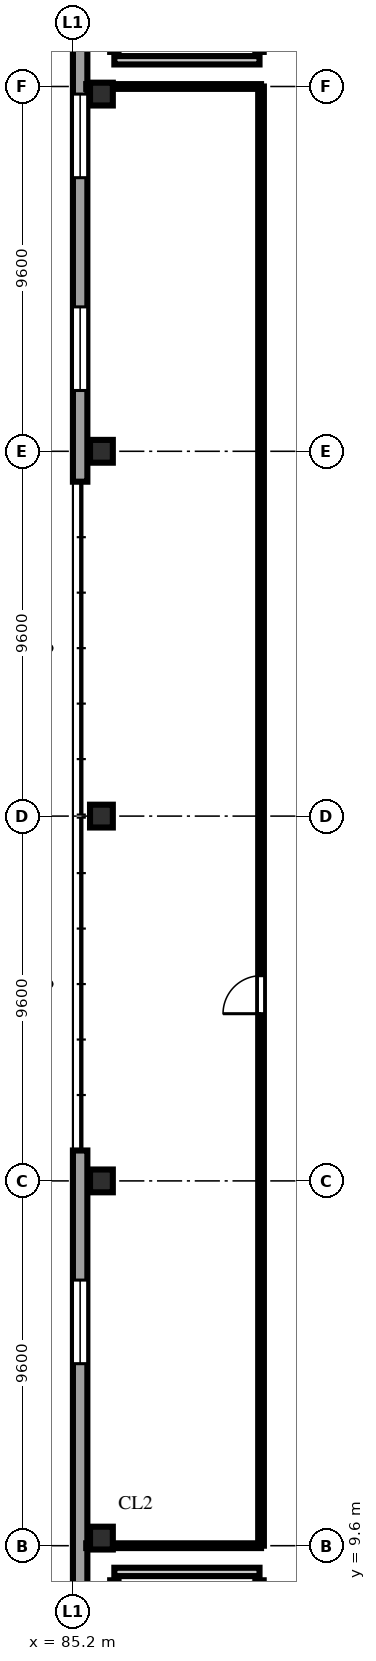
"""IFC4 building model, lengths in metres.
Left out: names, types, materials, properties, quantities, classifications, styles, units other than length and angle.
Written with IfcOpenShell. Run it as: python <this file> out.ifc"""

import sys

from ifc_helpers import new_model, si_unit, direction, frame, frame_2d, origin, origin_2d, place, context, subcontext, project, spatial, rectangle, extrude, element, fill, save


model = new_model("IFC4")
c1 = context("Model", 3, precision=1e-05, world=origin(), true_north=direction((0.0, 1.0)))
c2 = subcontext(c1, "Body", "Model", "MODEL_VIEW")
j1 = project(units=[si_unit("LENGTHUNIT", "METRE"), si_unit("PLANEANGLEUNIT", "RADIAN")], contexts=[c1])
p1 = place(None, origin())
s1 = spatial("IfcSite", under=j1, at=p1, CompositionType="ELEMENT")
p2 = place(p1, origin())
s2 = spatial("IfcBuilding", under=s1, at=p2, CompositionType="ELEMENT")
p3 = place(p2, frame((0.0, 0.0, 10.4)))
s3 = spatial("IfcBuildingStorey", under=s2, at=p3, CompositionType="ELEMENT", Elevation=10.4)
for number, where, z_axis, x_axis in (
    (1, (85.95, 9.8, 0.0), (0.0, 0.0, 1.0), (1.0, 0.0, 0.0)),
    (2, (85.95, 19.2, 0.0), (0.0, 0.0, 1.0), (1.0, 0.0, 0.0)),
    (3, (85.95, 28.8, 0.0), (0.0, 0.0, 1.0), (1.0, 0.0, 0.0)),
    (4, (85.95, 38.4, 0.0), (0.0, 0.0, 1.0), (1.0, 0.0, 0.0)),
    (5, (85.95, 47.8, 0.0), (0.0, 0.0, 1.0), (1.0, 0.0, 0.0)),
):
    element("IfcColumn", number, at=place(p3, frame(where, z_axis=z_axis, x_axis=x_axis)), inside=s3, PredefinedType="COLUMN", context=c2, shape_type="SweptSolid", body=[
        extrude(rectangle(XDim=0.6, YDim=0.6, at=origin_2d()), origin(), (0.0, 0.0, 1.0), 4.6),
    ])
p4 = place(p3, frame((85.39, 0.19, 0.0), z_axis=(0.0, 0.0, 1.0), x_axis=(0.0, 1.0, 0.0)))
e6 = element("IfcWall", 6, at=p4, inside=s3, PredefinedType="SOLIDWALL", context=c2, shape_type="SweptSolid", body=[
    extrude(rectangle(XDim=19.81, YDim=0.38, at=frame_2d((9.905, 0.0))), origin(), (0.0, 0.0, 1.0), 4.25),
])
p5 = place(p4, frame((4.8, 0.0, 0.85)))
e7 = element("IfcOpeningElement", 7, at=p5, cuts=e6, PredefinedType="OPENING", context=c2, shape_type="SweptSolid", body=[
    extrude(rectangle(XDim=2.2, YDim=2.25, at=frame_2d((1.1, 1.125))), frame((0.0, 0.202, 0.0), z_axis=(0.0, -1.0, 0.0), x_axis=(1.0, 0.0, 0.0)), (0.0, 0.0, 1.0), 0.404),
])
p6 = place(p4, frame((14.2, 0.0, 0.85)))
e8 = element("IfcOpeningElement", 8, at=p6, cuts=e6, PredefinedType="OPENING", context=c2, shape_type="SweptSolid", body=[
    extrude(rectangle(XDim=2.2, YDim=2.25, at=frame_2d((1.1, 1.125))), frame((0.0, 0.202, 0.0), z_axis=(0.0, -1.0, 0.0), x_axis=(1.0, 0.0, 0.0)), (0.0, 0.0, 1.0), 0.404),
])
p7 = place(p3, frame((85.39, 37.6, 0.0), z_axis=(0.0, 0.0, 1.0), x_axis=(0.0, 1.0, 0.0)))
e9 = element("IfcWall", 9, at=p7, inside=s3, PredefinedType="SOLIDWALL", context=c2, shape_type="SweptSolid", body=[
    extrude(rectangle(XDim=19.81, YDim=0.38, at=frame_2d((9.905, 0.0))), origin(), (0.0, 0.0, 1.0), 4.25),
])
p8 = place(p7, frame((2.4, 0.0, 0.85)))
e10 = element("IfcOpeningElement", 10, at=p8, cuts=e9, PredefinedType="OPENING", context=c2, shape_type="SweptSolid", body=[
    extrude(rectangle(XDim=2.2, YDim=2.25, at=frame_2d((1.1, 1.125))), frame((0.0, 0.202, 0.0), z_axis=(0.0, -1.0, 0.0), x_axis=(1.0, 0.0, 0.0)), (0.0, 0.0, 1.0), 0.404),
])
p9 = place(p7, frame((8.0, 0.0, 0.85)))
e11 = element("IfcOpeningElement", 11, at=p9, cuts=e9, PredefinedType="OPENING", context=c2, shape_type="SweptSolid", body=[
    extrude(rectangle(XDim=2.2, YDim=2.25, at=frame_2d((1.1, 1.125))), frame((0.0, 0.202, 0.0), z_axis=(0.0, -1.0, 0.0), x_axis=(1.0, 0.0, 0.0)), (0.0, 0.0, 1.0), 0.404),
])
p10 = place(p3, frame((86.29, 1.31, 0.0), z_axis=(0.0, 0.0, 1.0), x_axis=(0.0, 1.0, 0.0)))
e12 = element("IfcWall", 12, at=p10, inside=s3, PredefinedType="SOLIDWALL", context=c2, shape_type="SweptSolid", body=[
    extrude(rectangle(XDim=7.38, YDim=0.22, at=frame_2d((3.69, 0.0))), origin(), (0.0, 0.0, 1.0), 4.25),
])
p11 = place(p3, frame((86.29, 8.91, 0.0), z_axis=(0.0, 0.0, 1.0), x_axis=(1.0, 0.0, 0.0)))
e13 = element("IfcWall", 13, at=p11, inside=s3, PredefinedType="SOLIDWALL", context=c2, shape_type="SweptSolid", body=[
    extrude(rectangle(XDim=3.82, YDim=0.22, at=frame_2d((1.91, 0.0))), origin(), (0.0, 0.0, 1.0), 4.25),
])
p12 = place(p3, frame((90.11, 1.31, 0.0), z_axis=(0.0, 0.0, 1.0), x_axis=(0.0, 1.0, 0.0)))
e14 = element("IfcWall", 14, at=p12, inside=s3, PredefinedType="SOLIDWALL", context=c2, shape_type="SweptSolid", body=[
    extrude(rectangle(XDim=7.38, YDim=0.22, at=frame_2d((3.69, 0.0))), origin(), (0.0, 0.0, 1.0), 4.25),
])
p13 = place(p12, frame((0.14, 0.0, 0.0)))
e15 = element("IfcOpeningElement", 15, at=p13, cuts=e14, PredefinedType="OPENING", context=c2, shape_type="SweptSolid", body=[
    extrude(rectangle(XDim=1.1, YDim=2.2, at=frame_2d((0.55, 1.1))), frame((0.0, 0.122, 0.0), z_axis=(0.0, -1.0, 0.0), x_axis=(1.0, 0.0, 0.0)), (0.0, 0.0, 1.0), 0.244),
])
p14 = place(p3, frame((86.29, 48.91, 0.0), z_axis=(0.0, 0.0, 1.0), x_axis=(0.0, 1.0, 0.0)))
e16 = element("IfcWall", 16, at=p14, inside=s3, PredefinedType="SOLIDWALL", context=c2, shape_type="SweptSolid", body=[
    extrude(rectangle(XDim=7.38, YDim=0.22, at=frame_2d((3.69, 0.0))), origin(), (0.0, 0.0, 1.0), 4.25),
])
p15 = place(p3, frame((86.29, 48.69, 0.0), z_axis=(0.0, 0.0, 1.0), x_axis=(1.0, 0.0, 0.0)))
e17 = element("IfcWall", 17, at=p15, inside=s3, PredefinedType="SOLIDWALL", context=c2, shape_type="SweptSolid", body=[
    extrude(rectangle(XDim=3.82, YDim=0.22, at=frame_2d((1.91, 0.0))), origin(), (0.0, 0.0, 1.0), 4.25),
])
p16 = place(p3, frame((90.11, 48.91, 0.0), z_axis=(0.0, 0.0, 1.0), x_axis=(0.0, 1.0, 0.0)))
e18 = element("IfcWall", 18, at=p16, inside=s3, PredefinedType="SOLIDWALL", context=c2, shape_type="SweptSolid", body=[
    extrude(rectangle(XDim=7.38, YDim=0.22, at=frame_2d((3.69, 0.0))), origin(), (0.0, 0.0, 1.0), 4.25),
])
p17 = place(p16, frame((0.14, 0.0, 0.0)))
e19 = element("IfcOpeningElement", 19, at=p17, cuts=e18, PredefinedType="OPENING", context=c2, shape_type="SweptSolid", body=[
    extrude(rectangle(XDim=1.1, YDim=2.2, at=frame_2d((0.55, 1.1))), frame((0.0, 0.122, 0.0), z_axis=(0.0, -1.0, 0.0), x_axis=(1.0, 0.0, 0.0)), (0.0, 0.0, 1.0), 0.244),
])
p18 = place(p3, frame((85.55, 9.6, 0.0), z_axis=(0.0, 0.0, 1.0), x_axis=(1.0, 0.0, 0.0)))
e20 = element("IfcWall", 20, at=p18, inside=s3, PredefinedType="PARTITIONING", context=c2, shape_type="SweptSolid", body=[
    extrude(rectangle(XDim=0.4, YDim=0.125, at=frame_2d((0.2, 0.0))), origin(), (0.0, 0.0, 1.0), 4.25),
])
p19 = place(p3, frame((85.95, 9.6, 0.0), z_axis=(0.0, 0.0, 1.0), x_axis=(1.0, 0.0, 0.0)))
e21 = element("IfcWall", 21, at=p19, inside=s3, PredefinedType="PARTITIONING", context=c2, shape_type="SweptSolid", body=[
    extrude(rectangle(XDim=4.2, YDim=0.125, at=frame_2d((2.1, 0.0))), origin(), (0.0, 0.0, 1.0), 3.45),
])
p20 = place(p3, frame((85.55, 48.0, 0.0), z_axis=(0.0, 0.0, 1.0), x_axis=(1.0, 0.0, 0.0)))
e22 = element("IfcWall", 22, at=p20, inside=s3, PredefinedType="PARTITIONING", context=c2, shape_type="SweptSolid", body=[
    extrude(rectangle(XDim=0.4, YDim=0.125, at=frame_2d((0.2, 0.0))), origin(), (0.0, 0.0, 1.0), 4.25),
])
p21 = place(p3, frame((85.95, 48.0, 0.0), z_axis=(0.0, 0.0, 1.0), x_axis=(1.0, 0.0, 0.0)))
e23 = element("IfcWall", 23, at=p21, inside=s3, PredefinedType="PARTITIONING", context=c2, shape_type="SweptSolid", body=[
    extrude(rectangle(XDim=4.2, YDim=0.125, at=frame_2d((2.1, 0.0))), origin(), (0.0, 0.0, 1.0), 3.45),
])
p22 = place(p3, frame((90.15, 9.6, 0.0), z_axis=(0.0, 0.0, 1.0), x_axis=(0.0, 1.0, 0.0)))
e24 = element("IfcWall", 24, at=p22, inside=s3, PredefinedType="PARTITIONING", context=c2, shape_type="SweptSolid", body=[
    extrude(rectangle(XDim=38.4, YDim=0.15, at=frame_2d((19.2, 0.0))), origin(), (0.0, 0.0, 1.0), 4.25),
])
p23 = place(p22, frame((14.0, 0.0, 0.0)))
e25 = element("IfcOpeningElement", 25, at=p23, cuts=e24, PredefinedType="OPENING", context=c2, shape_type="SweptSolid", body=[
    extrude(rectangle(XDim=1.0, YDim=2.2, at=frame_2d((0.5, 1.1))), frame((0.0, 0.087, 0.0), z_axis=(0.0, -1.0, 0.0), x_axis=(1.0, 0.0, 0.0)), (0.0, 0.0, 1.0), 0.174),
])
p24 = place(p6, origin())
e26 = element("IfcWindow", 26, at=p24, inside=s3, PartitioningType="DOUBLE_PANEL_VERTICAL", PredefinedType="WINDOW", context=c2, shape_type="SweptSolid", body=[
    extrude(rectangle(XDim=2.2, YDim=2.25, at=frame_2d((1.1, 1.125))), frame((0.0, 0.11, 0.0), z_axis=(0.0, -1.0, 0.0), x_axis=(1.0, 0.0, 0.0)), (0.0, 0.0, 1.0), 0.06),
])
fill(e8, e26)
p25 = place(p8, origin())
e27 = element("IfcWindow", 27, at=p25, inside=s3, PartitioningType="DOUBLE_PANEL_VERTICAL", PredefinedType="WINDOW", context=c2, shape_type="SweptSolid", body=[
    extrude(rectangle(XDim=2.2, YDim=2.25, at=frame_2d((1.1, 1.125))), frame((0.0, 0.11, 0.0), z_axis=(0.0, -1.0, 0.0), x_axis=(1.0, 0.0, 0.0)), (0.0, 0.0, 1.0), 0.06),
])
fill(e10, e27)
p26 = place(p9, origin())
e28 = element("IfcWindow", 28, at=p26, inside=s3, PartitioningType="DOUBLE_PANEL_VERTICAL", PredefinedType="WINDOW", context=c2, shape_type="SweptSolid", body=[
    extrude(rectangle(XDim=2.2, YDim=2.25, at=frame_2d((1.1, 1.125))), frame((0.0, 0.11, 0.0), z_axis=(0.0, -1.0, 0.0), x_axis=(1.0, 0.0, 0.0)), (0.0, 0.0, 1.0), 0.06),
])
fill(e11, e28)
p27 = place(p23, origin())
e29 = element("IfcDoor", 29, at=p27, inside=s3, OperationType="SINGLE_SWING_LEFT", PredefinedType="DOOR", context=c2, shape_type="SweptSolid", body=[
    extrude(rectangle(XDim=1.0, YDim=2.2, at=frame_2d((0.5, 1.1))), frame((0.0, 0.025, 0.0), z_axis=(0.0, -1.0, 0.0), x_axis=(1.0, 0.0, 0.0)), (0.0, 0.0, 1.0), 0.05),
])
fill(e25, e29)
save(model, sys.argv[1])
